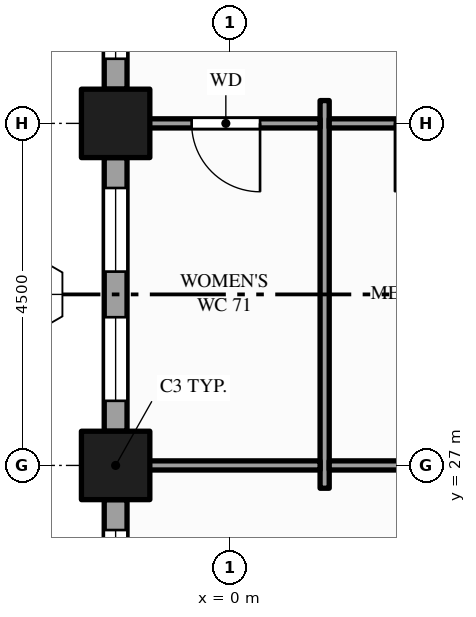
"""IFC4 building model, lengths in metres.
Left out: names, types, materials, properties, quantities, classifications, styles, units other than length and angle.
Written with IfcOpenShell. Run it as: python <this file> out.ifc"""

import sys

from ifc_helpers import new_model, si_unit, direction, frame, frame_2d, origin, origin_2d, place, context, subcontext, project, spatial, rectangle, hollow_rectangle, extrude, element, fill, save


model = new_model("IFC4")
c1 = context("Model", 3, precision=1e-05, world=origin(), true_north=direction((0.0, 1.0)))
c2 = subcontext(c1, "Body", "Model", "MODEL_VIEW")
j1 = project(units=[si_unit("LENGTHUNIT", "METRE"), si_unit("PLANEANGLEUNIT", "RADIAN")], contexts=[c1])
p1 = place(None, origin())
s1 = spatial("IfcSite", under=j1, at=p1, CompositionType="ELEMENT")
p2 = place(p1, origin())
s2 = spatial("IfcBuilding", under=s1, at=p2, CompositionType="ELEMENT")
p3 = place(p2, frame((0.0, 0.0, 171.0)))
s3 = spatial("IfcBuildingStorey", under=s2, at=p3, CompositionType="ELEMENT", Elevation=171.0)
for number, where, z_axis, x_axis in (
    (1, (-1.5, 27.0, -0.15), (0.0, 0.0, 1.0), (1.0, 0.0, 0.0)),
    (2, (-1.5, 31.5, -0.15), (0.0, 0.0, 1.0), (1.0, 0.0, 0.0)),
):
    element("IfcColumn", number, at=place(p3, frame(where, z_axis=z_axis, x_axis=x_axis)), inside=s3, PredefinedType="COLUMN", context=c2, shape_type="SweptSolid", body=[
        extrude(hollow_rectangle(XDim=0.9, YDim=0.9, WallThickness=0.045, at=origin_2d()), origin(), (0.0, 0.0, 1.0), 4.0),
    ])
p4 = place(p3, frame((-1.5, 35.55, 0.0), z_axis=(0.0, 0.0, 1.0), x_axis=(0.0, -1.0, 0.0)))
e3 = element("IfcWall", 3, at=p4, inside=s3, PredefinedType="STANDARD", context=c2, shape_type="SweptSolid", body=[
    extrude(rectangle(XDim=3.6, YDim=0.3, at=frame_2d((1.8, 0.0))), origin(), (0.0, 0.0, 1.0), 3.149),
])
p5 = place(p4, frame((0.4, 0.0, 0.9)))
e4 = element("IfcOpeningElement", 4, at=p5, cuts=e3, PredefinedType="OPENING", context=c2, shape_type="SweptSolid", body=[
    extrude(rectangle(XDim=1.1, YDim=2.0, at=frame_2d((0.55, 1.0))), frame((0.0, 0.16, 0.0), z_axis=(0.0, -1.0, 0.0), x_axis=(1.0, 0.0, 0.0)), (0.0, 0.0, 1.0), 0.32),
])
p6 = place(p4, frame((2.1, 0.0, 0.9)))
e5 = element("IfcOpeningElement", 5, at=p6, cuts=e3, PredefinedType="OPENING", context=c2, shape_type="SweptSolid", body=[
    extrude(rectangle(XDim=1.1, YDim=2.0, at=frame_2d((0.55, 1.0))), frame((0.0, 0.16, 0.0), z_axis=(0.0, -1.0, 0.0), x_axis=(1.0, 0.0, 0.0)), (0.0, 0.0, 1.0), 0.32),
])
p7 = place(p3, frame((-1.5, 31.05, 0.0), z_axis=(0.0, 0.0, 1.0), x_axis=(0.0, -1.0, 0.0)))
e6 = element("IfcWall", 6, at=p7, inside=s3, PredefinedType="STANDARD", context=c2, shape_type="SweptSolid", body=[
    extrude(rectangle(XDim=3.6, YDim=0.3, at=frame_2d((1.8, 0.0))), origin(), (0.0, 0.0, 1.0), 3.149),
])
p8 = place(p7, frame((0.4, 0.0, 0.9)))
e7 = element("IfcOpeningElement", 7, at=p8, cuts=e6, PredefinedType="OPENING", context=c2, shape_type="SweptSolid", body=[
    extrude(rectangle(XDim=1.1, YDim=2.0, at=frame_2d((0.55, 1.0))), frame((0.0, 0.16, 0.0), z_axis=(0.0, -1.0, 0.0), x_axis=(1.0, 0.0, 0.0)), (0.0, 0.0, 1.0), 0.32),
])
p9 = place(p7, frame((2.1, 0.0, 0.9)))
e8 = element("IfcOpeningElement", 8, at=p9, cuts=e6, PredefinedType="OPENING", context=c2, shape_type="SweptSolid", body=[
    extrude(rectangle(XDim=1.1, YDim=2.0, at=frame_2d((0.55, 1.0))), frame((0.0, 0.16, 0.0), z_axis=(0.0, -1.0, 0.0), x_axis=(1.0, 0.0, 0.0)), (0.0, 0.0, 1.0), 0.32),
])
p10 = place(p3, frame((-1.5, 26.55, 0.0), z_axis=(0.0, 0.0, 1.0), x_axis=(0.0, -1.0, 0.0)))
e9 = element("IfcWall", 9, at=p10, inside=s3, PredefinedType="STANDARD", context=c2, shape_type="SweptSolid", body=[
    extrude(rectangle(XDim=3.6, YDim=0.3, at=frame_2d((1.8, 0.0))), origin(), (0.0, 0.0, 1.0), 3.149),
])
p11 = place(p10, frame((0.4, 0.0, 0.9)))
e10 = element("IfcOpeningElement", 10, at=p11, cuts=e9, PredefinedType="OPENING", context=c2, shape_type="SweptSolid", body=[
    extrude(rectangle(XDim=1.1, YDim=2.0, at=frame_2d((0.55, 1.0))), frame((0.0, 0.16, 0.0), z_axis=(0.0, -1.0, 0.0), x_axis=(1.0, 0.0, 0.0)), (0.0, 0.0, 1.0), 0.32),
])
p12 = place(p10, frame((2.1, 0.0, 0.9)))
e11 = element("IfcOpeningElement", 11, at=p12, cuts=e9, PredefinedType="OPENING", context=c2, shape_type="SweptSolid", body=[
    extrude(rectangle(XDim=1.1, YDim=2.0, at=frame_2d((0.55, 1.0))), frame((0.0, 0.16, 0.0), z_axis=(0.0, -1.0, 0.0), x_axis=(1.0, 0.0, 0.0)), (0.0, 0.0, 1.0), 0.32),
])
p13 = place(p3, frame((1.25, 26.7, 0.0), z_axis=(0.0, 0.0, 1.0), x_axis=(0.0, 1.0, 0.0)))
e12 = element("IfcWall", 12, at=p13, inside=s3, PredefinedType="PARTITIONING", context=c2, shape_type="SweptSolid", body=[
    extrude(rectangle(XDim=5.1, YDim=0.12, at=frame_2d((2.55, 0.0))), origin(), (0.0, 0.0, 1.0), 3.85),
])
p14 = place(p3, frame((-1.35, 27.0, 0.0), z_axis=(0.0, 0.0, 1.0), x_axis=(1.0, 0.0, 0.0)))
e13 = element("IfcWall", 13, at=p14, inside=s3, PredefinedType="PARTITIONING", context=c2, shape_type="SweptSolid", body=[
    extrude(rectangle(XDim=2.54, YDim=0.12, at=frame_2d((1.27, 0.0))), origin(), (0.0, 0.0, 1.0), 2.87),
])
p15 = place(p3, frame((1.31, 27.0, 0.0), z_axis=(0.0, 0.0, 1.0), x_axis=(1.0, 0.0, 0.0)))
e14 = element("IfcWall", 14, at=p15, inside=s3, PredefinedType="PARTITIONING", context=c2, shape_type="SweptSolid", body=[
    extrude(rectangle(XDim=2.63, YDim=0.12, at=frame_2d((1.315, 0.0))), origin(), (0.0, 0.0, 1.0), 2.87),
])
p16 = place(p3, frame((-1.35, 31.5, 0.0), z_axis=(0.0, 0.0, 1.0), x_axis=(1.0, 0.0, 0.0)))
e15 = element("IfcWall", 15, at=p16, inside=s3, PredefinedType="PARTITIONING", context=c2, shape_type="SweptSolid", body=[
    extrude(rectangle(XDim=2.54, YDim=0.12, at=frame_2d((1.27, 0.0))), origin(), (0.0, 0.0, 1.0), 2.87),
])
p17 = place(p16, frame((0.85, 0.0, 0.0)))
e16 = element("IfcOpeningElement", 16, at=p17, cuts=e15, PredefinedType="OPENING", context=c2, shape_type="SweptSolid", body=[
    extrude(rectangle(XDim=0.9, YDim=2.1, at=frame_2d((0.45, 1.05))), frame((0.0, 0.07, 0.0), z_axis=(0.0, -1.0, 0.0), x_axis=(1.0, 0.0, 0.0)), (0.0, 0.0, 1.0), 0.14),
])
p18 = place(p3, frame((1.31, 31.5, 0.0), z_axis=(0.0, 0.0, 1.0), x_axis=(1.0, 0.0, 0.0)))
e17 = element("IfcWall", 17, at=p18, inside=s3, PredefinedType="PARTITIONING", context=c2, shape_type="SweptSolid", body=[
    extrude(rectangle(XDim=2.63, YDim=0.12, at=frame_2d((1.315, 0.0))), origin(), (0.0, 0.0, 1.0), 2.87),
])
p19 = place(p18, frame((0.865, 0.0, 0.0)))
e18 = element("IfcOpeningElement", 18, at=p19, cuts=e17, PredefinedType="OPENING", context=c2, shape_type="SweptSolid", body=[
    extrude(rectangle(XDim=0.9, YDim=2.1, at=frame_2d((0.45, 1.05))), frame((0.0, 0.07, 0.0), z_axis=(0.0, -1.0, 0.0), x_axis=(1.0, 0.0, 0.0)), (0.0, 0.0, 1.0), 0.14),
])
p20 = place(p6, origin())
e19 = element("IfcWindow", 19, at=p20, inside=s3, PartitioningType="SINGLE_PANEL", PredefinedType="WINDOW", context=c2, shape_type="SweptSolid", body=[
    extrude(rectangle(XDim=1.1, YDim=2.0, at=frame_2d((0.55, 1.0))), frame((0.0, 0.03, 0.0), z_axis=(0.0, -1.0, 0.0), x_axis=(1.0, 0.0, 0.0)), (0.0, 0.0, 1.0), 0.06),
])
fill(e5, e19)
p21 = place(p8, origin())
e20 = element("IfcWindow", 20, at=p21, inside=s3, PartitioningType="SINGLE_PANEL", PredefinedType="WINDOW", context=c2, shape_type="SweptSolid", body=[
    extrude(rectangle(XDim=1.1, YDim=2.0, at=frame_2d((0.55, 1.0))), frame((0.0, 0.03, 0.0), z_axis=(0.0, -1.0, 0.0), x_axis=(1.0, 0.0, 0.0)), (0.0, 0.0, 1.0), 0.06),
])
fill(e7, e20)
p22 = place(p9, origin())
e21 = element("IfcWindow", 21, at=p22, inside=s3, PartitioningType="SINGLE_PANEL", PredefinedType="WINDOW", context=c2, shape_type="SweptSolid", body=[
    extrude(rectangle(XDim=1.1, YDim=2.0, at=frame_2d((0.55, 1.0))), frame((0.0, 0.03, 0.0), z_axis=(0.0, -1.0, 0.0), x_axis=(1.0, 0.0, 0.0)), (0.0, 0.0, 1.0), 0.06),
])
fill(e8, e21)
p23 = place(p11, origin())
e22 = element("IfcWindow", 22, at=p23, inside=s3, PartitioningType="SINGLE_PANEL", PredefinedType="WINDOW", context=c2, shape_type="SweptSolid", body=[
    extrude(rectangle(XDim=1.1, YDim=2.0, at=frame_2d((0.55, 1.0))), frame((0.0, 0.03, 0.0), z_axis=(0.0, -1.0, 0.0), x_axis=(1.0, 0.0, 0.0)), (0.0, 0.0, 1.0), 0.06),
])
fill(e10, e22)
p24 = place(p17, origin())
e23 = element("IfcDoor", 23, at=p24, inside=s3, OperationType="SINGLE_SWING_RIGHT", PredefinedType="DOOR", context=c2, shape_type="SweptSolid", body=[
    extrude(rectangle(XDim=0.9, YDim=2.1, at=frame_2d((0.45, 1.05))), frame((0.0, 0.025, 0.0), z_axis=(0.0, -1.0, 0.0), x_axis=(1.0, 0.0, 0.0)), (0.0, 0.0, 1.0), 0.05),
])
fill(e16, e23)
p25 = place(p19, origin())
e24 = element("IfcDoor", 24, at=p25, inside=s3, OperationType="SINGLE_SWING_LEFT", PredefinedType="DOOR", context=c2, shape_type="SweptSolid", body=[
    extrude(rectangle(XDim=0.9, YDim=2.1, at=frame_2d((0.45, 1.05))), frame((0.0, 0.025, 0.0), z_axis=(0.0, -1.0, 0.0), x_axis=(1.0, 0.0, 0.0)), (0.0, 0.0, 1.0), 0.05),
])
fill(e18, e24)
save(model, sys.argv[1])
